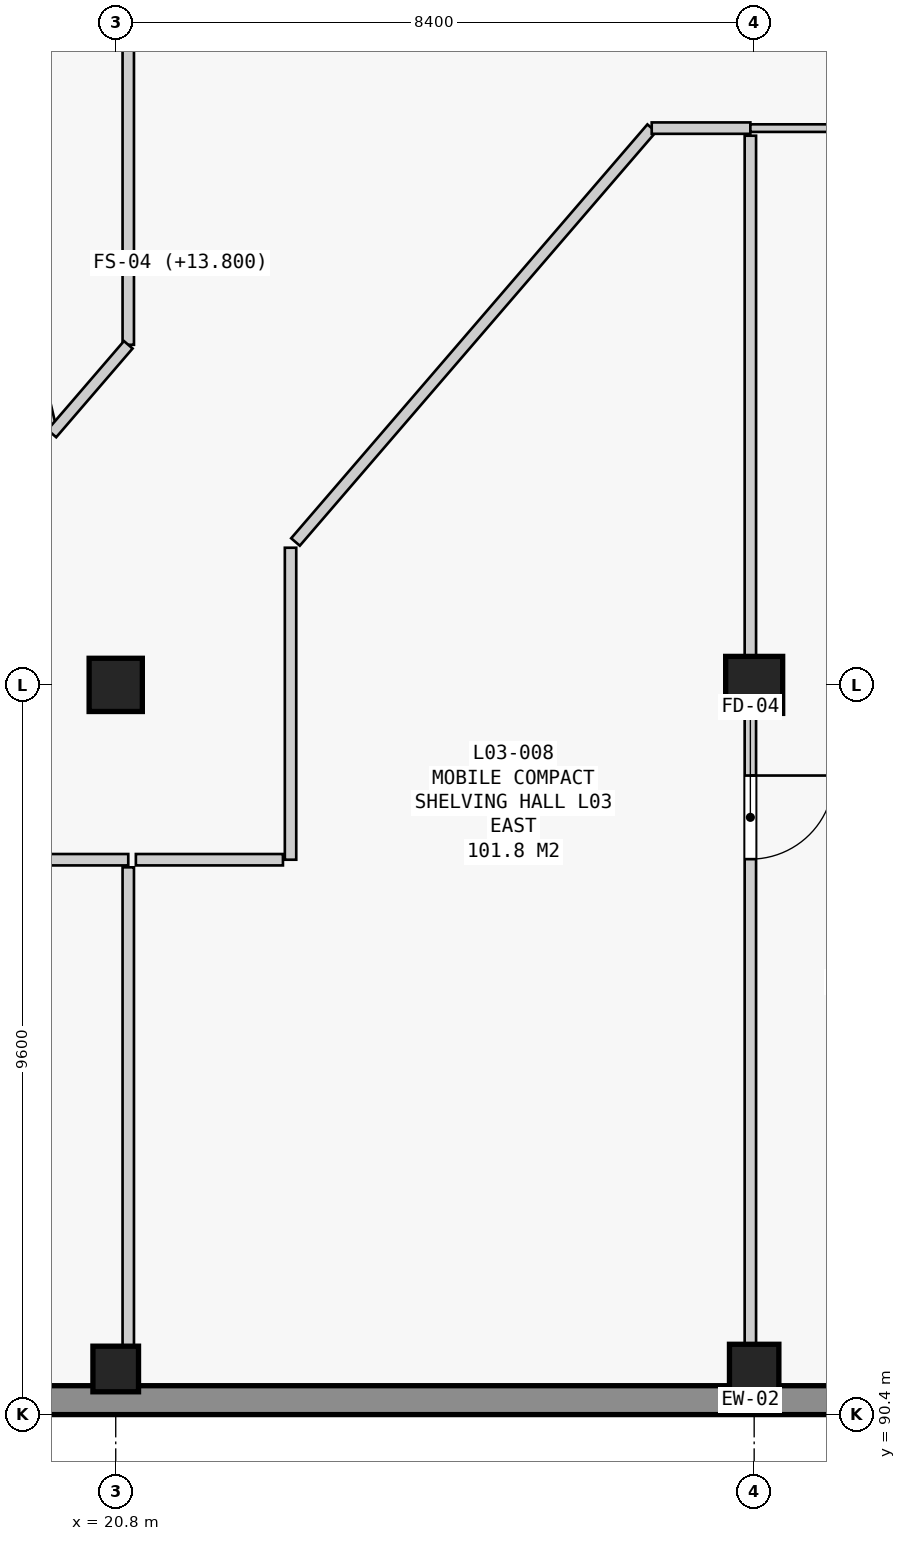
"""IFC4 building model, lengths in metres.
Left out: names, types, materials, properties, quantities, classifications, styles, units other than length and angle.
Written with IfcOpenShell. Run it as: python <this file> out.ifc"""

import sys

from ifc_helpers import new_model, si_unit, direction, frame, frame_2d, origin, origin_2d, place, context, subcontext, project, spatial, rectangle, extrude, element, fill, save


model = new_model("IFC4")
c1 = context("Model", 3, precision=1e-05, world=origin(), true_north=direction((0.0, 1.0)))
c2 = subcontext(c1, "Body", "Model", "MODEL_VIEW")
j1 = project(units=[si_unit("LENGTHUNIT", "METRE"), si_unit("PLANEANGLEUNIT", "RADIAN")], contexts=[c1])
p1 = place(None, origin())
s1 = spatial("IfcSite", under=j1, at=p1, CompositionType="ELEMENT")
p2 = place(p1, origin())
s2 = spatial("IfcBuilding", under=s1, at=p2, CompositionType="ELEMENT")
p3 = place(p2, frame((0.0, 0.0, 13.8)))
s3 = spatial("IfcBuildingStorey", under=s2, at=p3, CompositionType="ELEMENT", Elevation=13.8)
p4 = place(p3, frame((20.8, 91.0, 0.0), z_axis=(0.0, 0.0, 1.0), x_axis=(1.0, 0.0, 0.0)))
e1 = element("IfcColumn", 1, at=p4, inside=s3, PredefinedType="COLUMN", context=c2, shape_type="SweptSolid", body=[
    extrude(rectangle(XDim=0.6, YDim=0.6, at=origin_2d()), origin(), (0.0, 0.0, 1.0), 4.5),
])
p5 = place(p3, frame((20.8, 100.0, 0.0), z_axis=(0.0, 0.0, 1.0), x_axis=(1.0, 0.0, 0.0)))
e2 = element("IfcColumn", 2, at=p5, inside=s3, PredefinedType="COLUMN", context=c2, shape_type="SweptSolid", body=[
    extrude(rectangle(XDim=0.7, YDim=0.7, at=origin_2d()), origin(), (0.0, 0.0, 1.0), 4.5),
])
p6 = place(p3, frame((29.2, 91.0, 0.0), z_axis=(0.0, 0.0, 1.0), x_axis=(1.0, 0.0, 0.0)))
e3 = element("IfcColumn", 3, at=p6, inside=s3, PredefinedType="COLUMN", context=c2, shape_type="SweptSolid", body=[
    extrude(rectangle(XDim=0.65, YDim=0.65, at=origin_2d()), origin(), (0.0, 0.0, 1.0), 4.5),
])
p7 = place(p3, frame((29.2, 100.0, 0.0), z_axis=(0.0, 0.0, 1.0), x_axis=(1.0, 0.0, 0.0)))
e4 = element("IfcColumn", 4, at=p7, inside=s3, PredefinedType="COLUMN", context=c2, shape_type="SweptSolid", body=[
    extrude(rectangle(XDim=0.75, YDim=0.75, at=origin_2d()), origin(), (0.0, 0.0, 1.0), 4.5),
])
p8 = place(p3, frame((45.71, 90.59, 0.0), z_axis=(0.0, 0.0, 1.0), x_axis=(-1.0, 0.0, 0.0)))
e5 = element("IfcWall", 5, at=p8, inside=s3, PredefinedType="STANDARD", context=c2, shape_type="SweptSolid", body=[
    extrude(rectangle(XDim=33.12, YDim=0.38, at=frame_2d((16.56, 0.0))), origin(), (0.0, 0.0, 1.0), 4.18),
])
p9 = place(p3, frame((19.96, 103.307, 0.0), z_axis=(0.0, 0.0, 1.0), x_axis=(-0.229592143179, 0.973286929837, 0.0)))
e6 = element("IfcWall", 6, at=p9, inside=s3, PredefinedType="PARTITIONING", context=c2, shape_type="SweptSolid", body=[
    extrude(rectangle(XDim=2.338, YDim=0.15, at=frame_2d((1.169, 0.0))), origin(), (0.0, 0.0, 1.0), 4.18),
])
p10 = place(p3, frame((18.5, 97.7, 0.0), z_axis=(0.0, 0.0, 1.0), x_axis=(1.0, 0.0, 0.0)))
e7 = element("IfcWall", 7, at=p10, inside=s3, PredefinedType="PARTITIONING", context=c2, shape_type="SweptSolid", body=[
    extrude(rectangle(XDim=2.465, YDim=0.15, at=frame_2d((1.232, 0.0))), origin(), (0.0, 0.0, 1.0), 3.31),
])
p11 = place(p3, frame((20.965, 97.6, 0.0), z_axis=(0.0, 0.0, 1.0), x_axis=(0.0, -1.0, 0.0)))
e8 = element("IfcWall", 8, at=p11, inside=s3, PredefinedType="PARTITIONING", context=c2, shape_type="SweptSolid", body=[
    extrude(rectangle(XDim=6.91, YDim=0.15, at=frame_2d((3.455, 0.0))), origin(), (0.0, 0.0, 1.0), 3.31),
])
p12 = place(p3, frame((20.965, 117.71, 0.0), z_axis=(0.0, 0.0, 1.0), x_axis=(0.0, -1.0, 0.0)))
e9 = element("IfcWall", 9, at=p12, inside=s3, PredefinedType="PARTITIONING", context=c2, shape_type="SweptSolid", body=[
    extrude(rectangle(XDim=13.235, YDim=0.15, at=frame_2d((6.618, 0.0))), origin(), (0.0, 0.0, 1.0), 4.18),
])
p13 = place(p12, frame((6.068, 0.0, 0.0)))
e10 = element("IfcOpeningElement", 10, at=p13, cuts=e9, PredefinedType="OPENING", context=c2, shape_type="SweptSolid", body=[
    extrude(rectangle(XDim=1.1, YDim=2.15, at=frame_2d((0.55, 1.075))), frame((0.0, 0.085, 0.0), z_axis=(0.0, -1.0, 0.0), x_axis=(1.0, 0.0, 0.0)), (0.0, 0.0, 1.0), 0.17),
])
p14 = place(p3, frame((20.965, 104.475, 0.0), z_axis=(0.0, 0.0, 1.0), x_axis=(-0.652368947126, -0.75790154824, 0.0)))
e11 = element("IfcWall", 11, at=p14, inside=s3, PredefinedType="PARTITIONING", context=c2, shape_type="SweptSolid", body=[
    extrude(rectangle(XDim=1.541, YDim=0.15, at=frame_2d((0.771, 0.0))), origin(), (0.0, 0.0, 1.0), 4.18),
])
p15 = place(p3, frame((23.1, 97.7, 0.0), z_axis=(0.0, 0.0, 1.0), x_axis=(0.0, 1.0, 0.0)))
e12 = element("IfcWall", 12, at=p15, inside=s3, PredefinedType="PARTITIONING", context=c2, shape_type="SweptSolid", body=[
    extrude(rectangle(XDim=4.104, YDim=0.15, at=frame_2d((2.052, 0.0))), origin(), (0.0, 0.0, 1.0), 3.31),
])
p16 = place(p3, frame((23.165, 101.88, 0.0), z_axis=(0.0, 0.0, 1.0), x_axis=(0.652376770796, 0.757894813893, 0.0)))
e13 = element("IfcWall", 13, at=p16, inside=s3, PredefinedType="PARTITIONING", context=c2, shape_type="SweptSolid", body=[
    extrude(rectangle(XDim=7.184, YDim=0.15, at=frame_2d((3.592, 0.0))), origin(), (0.0, 0.0, 1.0), 4.18),
])
p17 = place(p3, frame((27.852, 107.325, 0.0), z_axis=(0.0, 0.0, 1.0), x_axis=(1.0, 0.0, 0.0)))
e14 = element("IfcWall", 14, at=p17, inside=s3, PredefinedType="PARTITIONING", context=c2, shape_type="SweptSolid", body=[
    extrude(rectangle(XDim=1.298, YDim=0.15, at=frame_2d((0.649, 0.0))), origin(), (0.0, 0.0, 1.0), 3.46),
])
p18 = place(p3, frame((29.15, 107.225, 0.0), z_axis=(0.0, 0.0, 1.0), x_axis=(0.0, -1.0, 0.0)))
e15 = element("IfcWall", 15, at=p18, inside=s3, PredefinedType="PARTITIONING", context=c2, shape_type="SweptSolid", body=[
    extrude(rectangle(XDim=16.535, YDim=0.15, at=frame_2d((8.268, 0.0))), origin(), (0.0, 0.0, 1.0), 3.26),
])
p19 = place(p18, frame((8.417, 0.0, 0.0)))
e16 = element("IfcOpeningElement", 16, at=p19, cuts=e15, PredefinedType="OPENING", context=c2, shape_type="SweptSolid", body=[
    extrude(rectangle(XDim=1.1, YDim=2.15, at=frame_2d((0.55, 1.075))), frame((0.0, 0.085, 0.0), z_axis=(0.0, -1.0, 0.0), x_axis=(1.0, 0.0, 0.0)), (0.0, 0.0, 1.0), 0.17),
])
p20 = place(p3, frame((21.065, 97.7, 0.0), z_axis=(0.0, 0.0, 1.0), x_axis=(1.0, 0.0, 0.0)))
e17 = element("IfcWall", 17, at=p20, inside=s3, PredefinedType="PARTITIONING", context=c2, shape_type="SweptSolid", body=[
    extrude(rectangle(XDim=1.935, YDim=0.15, at=frame_2d((0.968, 0.0))), origin(), (0.0, 0.0, 1.0), 3.31),
])
p21 = place(p3, frame((29.15, 107.325, 0.0), z_axis=(0.0, 0.0, 1.0), x_axis=(1.0, 0.0, 0.0)))
e18 = element("IfcWall", 18, at=p21, inside=s3, PredefinedType="PARTITIONING", context=c2, shape_type="SweptSolid", body=[
    extrude(rectangle(XDim=1.45, YDim=0.1, at=frame_2d((0.725, 0.0))), origin(), (0.0, 0.0, 1.0), 3.46),
])
p22 = place(p19, origin())
e19 = element("IfcDoor", 19, at=p22, inside=s3, OperationType="SINGLE_SWING_LEFT", PredefinedType="DOOR", context=c2, shape_type="SweptSolid", body=[
    extrude(rectangle(XDim=1.1, YDim=2.15, at=frame_2d((0.55, 1.075))), frame((0.0, 0.025, 0.0), z_axis=(0.0, -1.0, 0.0), x_axis=(1.0, 0.0, 0.0)), (0.0, 0.0, 1.0), 0.05),
])
fill(e16, e19)
save(model, sys.argv[1])
